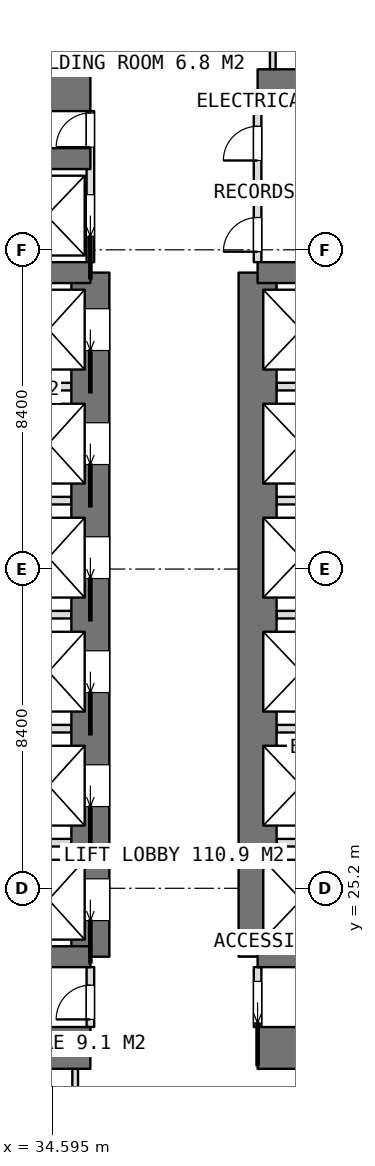
"""IFC4 building model, lengths in metres.
Left out: names, types, materials, properties, quantities, classifications, styles, units other than length and angle.
Written with IfcOpenShell. Run it as: python <this file> out.ifc"""

import sys

from ifc_helpers import new_model, si_unit, direction, frame, frame_2d, origin, place, context, subcontext, project, spatial, rectangle, extrude, element, fill, save


model = new_model("IFC4")
c1 = context("Model", 3, precision=1e-05, world=origin(), true_north=direction((0.0, 1.0)))
c2 = subcontext(c1, "Body", "Model", "MODEL_VIEW")
j1 = project(units=[si_unit("LENGTHUNIT", "METRE"), si_unit("PLANEANGLEUNIT", "RADIAN")], contexts=[c1])
p1 = place(None, origin())
s1 = spatial("IfcSite", under=j1, at=p1, CompositionType="ELEMENT")
p2 = place(p1, origin())
s2 = spatial("IfcBuilding", under=s1, at=p2, CompositionType="ELEMENT")
p3 = place(p2, frame((0.0, 0.0, 81.65)))
s3 = spatial("IfcBuildingStorey", under=s2, at=p3, CompositionType="ELEMENT", Elevation=81.65)
p4 = place(p3, frame((25.2, 21.0, 0.0), z_axis=(0.0, 0.0, 1.0), x_axis=(1.0, 0.0, 0.0)))
e1 = element("IfcWall", 1, at=p4, inside=s3, PredefinedType="SHEAR", context=c2, shape_type="SweptSolid", body=[
    extrude(rectangle(XDim=10.4, YDim=1.1, at=frame_2d((5.2, 0.0))), origin(), (0.0, 0.0, 1.0), 3.75),
])
p5 = place(p3, frame((40.0, 21.0, 0.0), z_axis=(0.0, 0.0, 1.0), x_axis=(1.0, 0.0, 0.0)))
e2 = element("IfcWall", 2, at=p5, inside=s3, PredefinedType="SHEAR", context=c2, shape_type="SweptSolid", body=[
    extrude(rectangle(XDim=10.4, YDim=1.1, at=frame_2d((5.2, 0.0))), origin(), (0.0, 0.0, 1.0), 3.75),
])
p6 = place(p3, frame((25.2, 46.2, 0.0), z_axis=(0.0, 0.0, 1.0), x_axis=(1.0, 0.0, 0.0)))
e3 = element("IfcWall", 3, at=p6, inside=s3, PredefinedType="SHEAR", context=c2, shape_type="SweptSolid", body=[
    extrude(rectangle(XDim=10.4, YDim=1.1, at=frame_2d((5.2, 0.0))), origin(), (0.0, 0.0, 1.0), 3.75),
])
p7 = place(p3, frame((40.0, 46.2, 0.0), z_axis=(0.0, 0.0, 1.0), x_axis=(1.0, 0.0, 0.0)))
e4 = element("IfcWall", 4, at=p7, inside=s3, PredefinedType="SHEAR", context=c2, shape_type="SweptSolid", body=[
    extrude(rectangle(XDim=10.4, YDim=1.1, at=frame_2d((5.2, 0.0))), origin(), (0.0, 0.0, 1.0), 3.75),
])
p8 = place(p3, frame((35.6, 23.4, 0.0), z_axis=(0.0, 0.0, 1.0), x_axis=(0.0, 1.0, 0.0)))
e5 = element("IfcWall", 5, at=p8, inside=s3, PredefinedType="SHEAR", context=c2, shape_type="SweptSolid", body=[
    extrude(rectangle(XDim=18.0, YDim=1.0, at=frame_2d((9.0, 0.0))), origin(), (0.0, 0.0, 1.0), 3.75),
])
p9 = place(p8, frame((0.95, 0.0, 0.0)))
e6 = element("IfcOpeningElement", 6, at=p9, cuts=e5, PredefinedType="OPENING", context=c2, shape_type="SweptSolid", body=[
    extrude(rectangle(XDim=1.1, YDim=2.1, at=frame_2d((0.55, 1.05))), frame((0.0, 0.51, 0.0), z_axis=(0.0, -1.0, 0.0), x_axis=(1.0, 0.0, 0.0)), (0.0, 0.0, 1.0), 1.02),
])
p10 = place(p8, frame((3.95, 0.0, 0.0)))
e7 = element("IfcOpeningElement", 7, at=p10, cuts=e5, PredefinedType="OPENING", context=c2, shape_type="SweptSolid", body=[
    extrude(rectangle(XDim=1.1, YDim=2.1, at=frame_2d((0.55, 1.05))), frame((0.0, 0.51, 0.0), z_axis=(0.0, -1.0, 0.0), x_axis=(1.0, 0.0, 0.0)), (0.0, 0.0, 1.0), 1.02),
])
p11 = place(p8, frame((6.95, 0.0, 0.0)))
e8 = element("IfcOpeningElement", 8, at=p11, cuts=e5, PredefinedType="OPENING", context=c2, shape_type="SweptSolid", body=[
    extrude(rectangle(XDim=1.1, YDim=2.1, at=frame_2d((0.55, 1.05))), frame((0.0, 0.51, 0.0), z_axis=(0.0, -1.0, 0.0), x_axis=(1.0, 0.0, 0.0)), (0.0, 0.0, 1.0), 1.02),
])
p12 = place(p8, frame((9.95, 0.0, 0.0)))
e9 = element("IfcOpeningElement", 9, at=p12, cuts=e5, PredefinedType="OPENING", context=c2, shape_type="SweptSolid", body=[
    extrude(rectangle(XDim=1.1, YDim=2.1, at=frame_2d((0.55, 1.05))), frame((0.0, 0.51, 0.0), z_axis=(0.0, -1.0, 0.0), x_axis=(1.0, 0.0, 0.0)), (0.0, 0.0, 1.0), 1.02),
])
p13 = place(p8, frame((12.95, 0.0, 0.0)))
e10 = element("IfcOpeningElement", 10, at=p13, cuts=e5, PredefinedType="OPENING", context=c2, shape_type="SweptSolid", body=[
    extrude(rectangle(XDim=1.1, YDim=2.1, at=frame_2d((0.55, 1.05))), frame((0.0, 0.51, 0.0), z_axis=(0.0, -1.0, 0.0), x_axis=(1.0, 0.0, 0.0)), (0.0, 0.0, 1.0), 1.02),
])
p14 = place(p8, frame((15.95, 0.0, 0.0)))
e11 = element("IfcOpeningElement", 11, at=p14, cuts=e5, PredefinedType="OPENING", context=c2, shape_type="SweptSolid", body=[
    extrude(rectangle(XDim=1.1, YDim=2.1, at=frame_2d((0.55, 1.05))), frame((0.0, 0.51, 0.0), z_axis=(0.0, -1.0, 0.0), x_axis=(1.0, 0.0, 0.0)), (0.0, 0.0, 1.0), 1.02),
])
p15 = place(p3, frame((40.0, 23.4, 0.0), z_axis=(0.0, 0.0, 1.0), x_axis=(0.0, 1.0, 0.0)))
e12 = element("IfcWall", 12, at=p15, inside=s3, PredefinedType="SHEAR", context=c2, shape_type="SweptSolid", body=[
    extrude(rectangle(XDim=18.0, YDim=1.0, at=frame_2d((9.0, 0.0))), origin(), (0.0, 0.0, 1.0), 3.75),
])
for number, where, z_axis, x_axis in (
    (13, (31.8, 23.4, 0.0), (0.0, 0.0, 1.0), (1.0, 0.0, 0.0)),
    (14, (31.8, 41.4, 0.0), (0.0, 0.0, 1.0), (1.0, 0.0, 0.0)),
    (15, (31.8, 44.4, 0.0), (0.0, 0.0, 1.0), (1.0, 0.0, 0.0)),
    (16, (40.0, 23.4, 0.0), (0.0, 0.0, 1.0), (1.0, 0.0, 0.0)),
    (17, (40.0, 41.4, 0.0), (0.0, 0.0, 1.0), (1.0, 0.0, 0.0)),
):
    element("IfcWall", number, at=place(p3, frame(where, z_axis=z_axis, x_axis=x_axis)), inside=s3, PredefinedType="SHEAR", context=c2, shape_type="SweptSolid", body=[
        extrude(rectangle(XDim=3.8, YDim=0.55, at=frame_2d((1.9, 0.0))), origin(), (0.0, 0.0, 1.0), 3.75),
    ])
for number, where, z_axis, x_axis in (
    (18, (32.075, 26.4, 0.0), (0.0, 0.0, 1.0), (1.0, 0.0, 0.0)),
    (19, (32.075, 29.4, 0.0), (0.0, 0.0, 1.0), (1.0, 0.0, 0.0)),
    (20, (32.075, 32.4, 0.0), (0.0, 0.0, 1.0), (1.0, 0.0, 0.0)),
    (21, (32.075, 35.4, 0.0), (0.0, 0.0, 1.0), (1.0, 0.0, 0.0)),
    (22, (32.075, 38.4, 0.0), (0.0, 0.0, 1.0), (1.0, 0.0, 0.0)),
):
    element("IfcWall", number, at=place(p3, frame(where, z_axis=z_axis, x_axis=x_axis)), inside=s3, PredefinedType="PARTITIONING", context=c2, shape_type="SweptSolid", body=[
        extrude(rectangle(XDim=3.025, YDim=0.2, at=frame_2d((1.513, 0.0))), origin(), (0.0, 0.0, 1.0), 3.4),
    ])
for number, where, z_axis, x_axis in (
    (23, (40.5, 26.4, 0.0), (0.0, 0.0, 1.0), (1.0, 0.0, 0.0)),
    (24, (40.5, 29.4, 0.0), (0.0, 0.0, 1.0), (1.0, 0.0, 0.0)),
    (25, (40.5, 32.4, 0.0), (0.0, 0.0, 1.0), (1.0, 0.0, 0.0)),
    (26, (40.5, 35.4, 0.0), (0.0, 0.0, 1.0), (1.0, 0.0, 0.0)),
    (27, (40.5, 38.4, 0.0), (0.0, 0.0, 1.0), (1.0, 0.0, 0.0)),
):
    element("IfcWall", number, at=place(p3, frame(where, z_axis=z_axis, x_axis=x_axis)), inside=s3, PredefinedType="PARTITIONING", context=c2, shape_type="SweptSolid", body=[
        extrude(rectangle(XDim=3.025, YDim=0.2, at=frame_2d((1.512, 0.0))), origin(), (0.0, 0.0, 1.0), 3.4),
    ])
p16 = place(p3, frame((40.0, 21.55, 0.0), z_axis=(0.0, 0.0, 1.0), x_axis=(0.0, 1.0, 0.0)))
e28 = element("IfcWall", 28, at=p16, inside=s3, PredefinedType="PARTITIONING", context=c2, shape_type="SweptSolid", body=[
    extrude(rectangle(XDim=1.575, YDim=0.2, at=frame_2d((0.788, 0.0))), origin(), (0.0, 0.0, 1.0), 3.4),
])
p17 = place(p16, frame((0.1, 0.0, 0.0)))
e29 = element("IfcOpeningElement", 29, at=p17, cuts=e28, PredefinedType="OPENING", context=c2, shape_type="SweptSolid", body=[
    extrude(rectangle(XDim=1.1, YDim=2.1, at=frame_2d((0.55, 1.05))), frame((0.0, 0.11, 0.0), z_axis=(0.0, -1.0, 0.0), x_axis=(1.0, 0.0, 0.0)), (0.0, 0.0, 1.0), 0.22),
])
p18 = place(p3, frame((40.0, 41.675, 0.0), z_axis=(0.0, 0.0, 1.0), x_axis=(0.0, 1.0, 0.0)))
e30 = element("IfcWall", 30, at=p18, inside=s3, PredefinedType="PARTITIONING", context=c2, shape_type="SweptSolid", body=[
    extrude(rectangle(XDim=3.975, YDim=0.2, at=frame_2d((1.987, 0.0))), origin(), (0.0, 0.0, 1.0), 3.4),
])
p19 = place(p18, frame((2.675, 0.0, 0.0)))
e31 = element("IfcOpeningElement", 31, at=p19, cuts=e30, PredefinedType="OPENING", context=c2, shape_type="SweptSolid", body=[
    extrude(rectangle(XDim=0.9, YDim=2.1, at=frame_2d((0.45, 1.05))), frame((0.0, 0.11, 0.0), z_axis=(0.0, -1.0, 0.0), x_axis=(1.0, 0.0, 0.0)), (0.0, 0.0, 1.0), 0.22),
])
p20 = place(p18, frame((0.275, 0.0, 0.0)))
e32 = element("IfcOpeningElement", 32, at=p20, cuts=e30, PredefinedType="OPENING", context=c2, shape_type="SweptSolid", body=[
    extrude(rectangle(XDim=0.9, YDim=2.1, at=frame_2d((0.45, 1.05))), frame((0.0, 0.11, 0.0), z_axis=(0.0, -1.0, 0.0), x_axis=(1.0, 0.0, 0.0)), (0.0, 0.0, 1.0), 0.22),
])
p21 = place(p3, frame((35.6, 41.675, 0.0), z_axis=(0.0, 0.0, 1.0), x_axis=(0.0, 1.0, 0.0)))
e33 = element("IfcWall", 33, at=p21, inside=s3, PredefinedType="PARTITIONING", context=c2, shape_type="SweptSolid", body=[
    extrude(rectangle(XDim=3.975, YDim=0.2, at=frame_2d((1.987, 0.0))), origin(), (0.0, 0.0, 1.0), 3.4),
])
p22 = place(p21, frame((3.025, 0.0, 0.0)))
e34 = element("IfcOpeningElement", 34, at=p22, cuts=e33, PredefinedType="OPENING", context=c2, shape_type="SweptSolid", body=[
    extrude(rectangle(XDim=0.9, YDim=2.1, at=frame_2d((0.45, 1.05))), frame((0.0, 0.11, 0.0), z_axis=(0.0, -1.0, 0.0), x_axis=(1.0, 0.0, 0.0)), (0.0, 0.0, 1.0), 0.22),
])
p23 = place(p21, frame((0.675, 0.0, 0.0)))
e35 = element("IfcOpeningElement", 35, at=p23, cuts=e33, PredefinedType="OPENING", context=c2, shape_type="SweptSolid", body=[
    extrude(rectangle(XDim=1.1, YDim=2.1, at=frame_2d((0.55, 1.05))), frame((0.0, 0.11, 0.0), z_axis=(0.0, -1.0, 0.0), x_axis=(1.0, 0.0, 0.0)), (0.0, 0.0, 1.0), 0.22),
])
p24 = place(p3, frame((35.6, 21.55, 0.0), z_axis=(0.0, 0.0, 1.0), x_axis=(0.0, 1.0, 0.0)))
e36 = element("IfcWall", 36, at=p24, inside=s3, PredefinedType="PARTITIONING", context=c2, shape_type="SweptSolid", body=[
    extrude(rectangle(XDim=1.575, YDim=0.2, at=frame_2d((0.788, 0.0))), origin(), (0.0, 0.0, 1.0), 3.4),
])
p25 = place(p24, frame((0.2, 0.0, 0.0)))
e37 = element("IfcOpeningElement", 37, at=p25, cuts=e36, PredefinedType="OPENING", context=c2, shape_type="SweptSolid", body=[
    extrude(rectangle(XDim=0.9, YDim=2.1, at=frame_2d((0.45, 1.05))), frame((0.0, 0.11, 0.0), z_axis=(0.0, -1.0, 0.0), x_axis=(1.0, 0.0, 0.0)), (0.0, 0.0, 1.0), 0.22),
])
p26 = place(p3, frame((40.0, 43.4, 0.0), z_axis=(0.0, 0.0, 1.0), x_axis=(1.0, 0.0, 0.0)))
e38 = element("IfcWall", 38, at=p26, inside=s3, PredefinedType="PARTITIONING", context=c2, shape_type="SweptSolid", body=[
    extrude(rectangle(XDim=3.525, YDim=0.2, at=frame_2d((1.762, 0.0))), origin(), (0.0, 0.0, 1.0), 3.4),
])
for number, where, z_axis, x_axis in (
    (39, (40.4, 46.75, 0.0), (0.0, 0.0, 1.0), (0.0, 1.0, 0.0)),
    (40, (35.2, 46.75, 0.0), (0.0, 0.0, 1.0), (0.0, 1.0, 0.0)),
    (41, (35.2, 17.875, 0.0), (0.0, 0.0, 1.0), (0.0, 1.0, 0.0)),
):
    element("IfcWall", number, at=place(p3, frame(where, z_axis=z_axis, x_axis=x_axis)), inside=s3, PredefinedType="PARTITIONING", context=c2, shape_type="SweptSolid", body=[
        extrude(rectangle(XDim=2.575, YDim=0.15, at=frame_2d((1.288, 0.0))), origin(), (0.0, 0.0, 1.0), 3.4),
    ])
p27 = place(p17, origin())
e42 = element("IfcDoor", 42, at=p27, inside=s3, OperationType="SLIDING_TO_LEFT", PredefinedType="DOOR", context=c2, shape_type="SweptSolid", body=[
    extrude(rectangle(XDim=1.1, YDim=2.1, at=frame_2d((0.55, 1.05))), frame((0.0, 0.025, 0.0), z_axis=(0.0, -1.0, 0.0), x_axis=(1.0, 0.0, 0.0)), (0.0, 0.0, 1.0), 0.05),
])
fill(e29, e42)
p28 = place(p25, origin())
e43 = element("IfcDoor", 43, at=p28, inside=s3, OperationType="SINGLE_SWING_LEFT", PredefinedType="DOOR", context=c2, shape_type="SweptSolid", body=[
    extrude(rectangle(XDim=0.9, YDim=2.1, at=frame_2d((0.45, 1.05))), frame((0.0, 0.025, 0.0), z_axis=(0.0, -1.0, 0.0), x_axis=(1.0, 0.0, 0.0)), (0.0, 0.0, 1.0), 0.05),
])
fill(e37, e43)
p29 = place(p19, origin())
e44 = element("IfcDoor", 44, at=p29, inside=s3, OperationType="SINGLE_SWING_LEFT", PredefinedType="DOOR", context=c2, shape_type="SweptSolid", body=[
    extrude(rectangle(XDim=0.9, YDim=2.1, at=frame_2d((0.45, 1.05))), frame((0.0, 0.025, 0.0), z_axis=(0.0, -1.0, 0.0), x_axis=(1.0, 0.0, 0.0)), (0.0, 0.0, 1.0), 0.05),
])
fill(e31, e44)
p30 = place(p20, origin())
e45 = element("IfcDoor", 45, at=p30, inside=s3, OperationType="SINGLE_SWING_LEFT", PredefinedType="DOOR", context=c2, shape_type="SweptSolid", body=[
    extrude(rectangle(XDim=0.9, YDim=2.1, at=frame_2d((0.45, 1.05))), frame((0.0, 0.025, 0.0), z_axis=(0.0, -1.0, 0.0), x_axis=(1.0, 0.0, 0.0)), (0.0, 0.0, 1.0), 0.05),
])
fill(e32, e45)
p31 = place(p22, origin())
e46 = element("IfcDoor", 46, at=p31, inside=s3, OperationType="SINGLE_SWING_LEFT", PredefinedType="DOOR", context=c2, shape_type="SweptSolid", body=[
    extrude(rectangle(XDim=0.9, YDim=2.1, at=frame_2d((0.45, 1.05))), frame((0.0, 0.025, 0.0), z_axis=(0.0, -1.0, 0.0), x_axis=(1.0, 0.0, 0.0)), (0.0, 0.0, 1.0), 0.05),
])
fill(e34, e46)
p32 = place(p9, origin())
e47 = element("IfcDoor", 47, at=p32, inside=s3, OperationType="SLIDING_TO_LEFT", PredefinedType="USERDEFINED", context=c2, shape_type="SweptSolid", body=[
    extrude(rectangle(XDim=1.1, YDim=2.1, at=frame_2d((0.55, 1.05))), frame((0.0, 0.025, 0.0), z_axis=(0.0, -1.0, 0.0), x_axis=(1.0, 0.0, 0.0)), (0.0, 0.0, 1.0), 0.05),
])
fill(e6, e47)
p33 = place(p10, origin())
e48 = element("IfcDoor", 48, at=p33, inside=s3, OperationType="SLIDING_TO_LEFT", PredefinedType="USERDEFINED", context=c2, shape_type="SweptSolid", body=[
    extrude(rectangle(XDim=1.1, YDim=2.1, at=frame_2d((0.55, 1.05))), frame((0.0, 0.025, 0.0), z_axis=(0.0, -1.0, 0.0), x_axis=(1.0, 0.0, 0.0)), (0.0, 0.0, 1.0), 0.05),
])
fill(e7, e48)
p34 = place(p11, origin())
e49 = element("IfcDoor", 49, at=p34, inside=s3, OperationType="SLIDING_TO_LEFT", PredefinedType="USERDEFINED", context=c2, shape_type="SweptSolid", body=[
    extrude(rectangle(XDim=1.1, YDim=2.1, at=frame_2d((0.55, 1.05))), frame((0.0, 0.025, 0.0), z_axis=(0.0, -1.0, 0.0), x_axis=(1.0, 0.0, 0.0)), (0.0, 0.0, 1.0), 0.05),
])
fill(e8, e49)
p35 = place(p12, origin())
e50 = element("IfcDoor", 50, at=p35, inside=s3, OperationType="SLIDING_TO_LEFT", PredefinedType="USERDEFINED", context=c2, shape_type="SweptSolid", body=[
    extrude(rectangle(XDim=1.1, YDim=2.1, at=frame_2d((0.55, 1.05))), frame((0.0, 0.025, 0.0), z_axis=(0.0, -1.0, 0.0), x_axis=(1.0, 0.0, 0.0)), (0.0, 0.0, 1.0), 0.05),
])
fill(e9, e50)
p36 = place(p13, origin())
e51 = element("IfcDoor", 51, at=p36, inside=s3, OperationType="SLIDING_TO_LEFT", PredefinedType="USERDEFINED", context=c2, shape_type="SweptSolid", body=[
    extrude(rectangle(XDim=1.1, YDim=2.1, at=frame_2d((0.55, 1.05))), frame((0.0, 0.025, 0.0), z_axis=(0.0, -1.0, 0.0), x_axis=(1.0, 0.0, 0.0)), (0.0, 0.0, 1.0), 0.05),
])
fill(e10, e51)
p37 = place(p14, origin())
e52 = element("IfcDoor", 52, at=p37, inside=s3, OperationType="SLIDING_TO_LEFT", PredefinedType="USERDEFINED", context=c2, shape_type="SweptSolid", body=[
    extrude(rectangle(XDim=1.1, YDim=2.1, at=frame_2d((0.55, 1.05))), frame((0.0, 0.025, 0.0), z_axis=(0.0, -1.0, 0.0), x_axis=(1.0, 0.0, 0.0)), (0.0, 0.0, 1.0), 0.05),
])
fill(e11, e52)
p38 = place(p23, origin())
e53 = element("IfcDoor", 53, at=p38, inside=s3, OperationType="SLIDING_TO_LEFT", PredefinedType="USERDEFINED", context=c2, shape_type="SweptSolid", body=[
    extrude(rectangle(XDim=1.1, YDim=2.1, at=frame_2d((0.55, 1.05))), frame((0.0, 0.025, 0.0), z_axis=(0.0, -1.0, 0.0), x_axis=(1.0, 0.0, 0.0)), (0.0, 0.0, 1.0), 0.05),
])
fill(e35, e53)
save(model, sys.argv[1])
